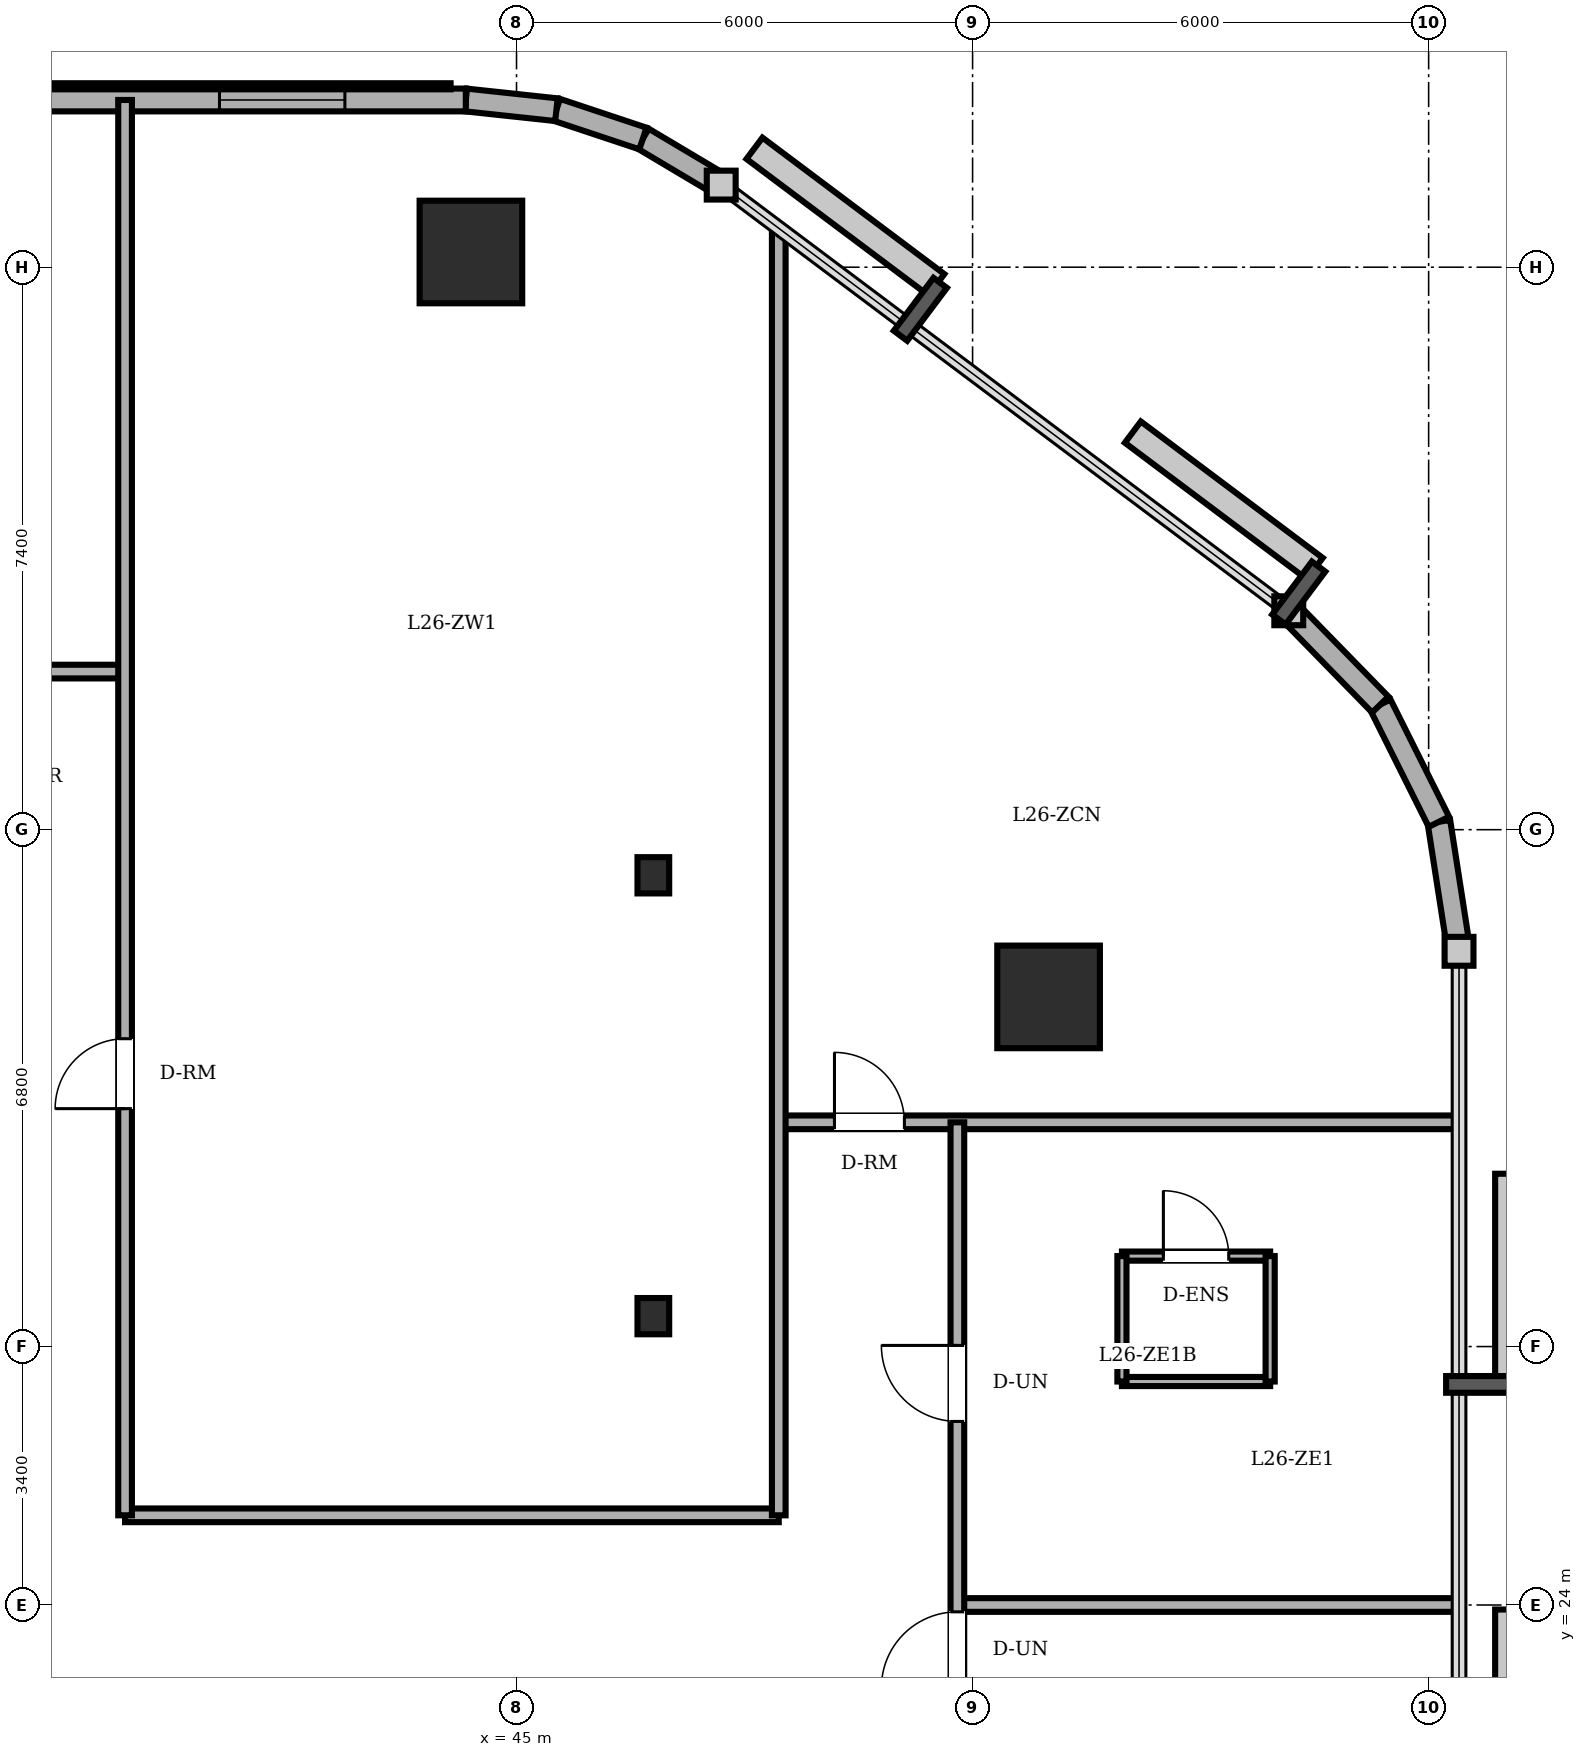
"""IFC4 building model, lengths in metres.
Left out: names, types, materials, properties, quantities, classifications, styles, units other than length and angle.
Written with IfcOpenShell. Run it as: python <this file> out.ifc"""

import sys

from ifc_helpers import new_model, si_unit, direction, frame, frame_2d, origin, origin_2d, place, context, subcontext, project, spatial, rectangle, circle, i_section, extrude, element, fill, save


model = new_model("IFC4")
c1 = context("Model", 3, precision=1e-05, world=origin(), true_north=direction((0.0, 1.0)))
c2 = subcontext(c1, "Body", "Model", "MODEL_VIEW")
j1 = project(units=[si_unit("LENGTHUNIT", "METRE"), si_unit("PLANEANGLEUNIT", "RADIAN")], contexts=[c1])
p1 = place(None, origin())
s1 = spatial("IfcSite", under=j1, at=p1, CompositionType="ELEMENT")
p2 = place(p1, origin())
s2 = spatial("IfcBuilding", under=s1, at=p2, CompositionType="ELEMENT")
p3 = place(p2, frame((0.0, 0.0, 100.7)))
s3 = spatial("IfcBuildingStorey", under=s2, at=p3, CompositionType="ELEMENT", Elevation=100.7)
for number, where, z_axis, x_axis in (
    (1, (52.0, 32.0, 0.0), (0.0, 0.0, 1.0), (1.0, 0.0, 0.0)),
    (2, (44.4, 41.8, 0.0), (0.0, 0.0, 1.0), (1.0, 0.0, 0.0)),
):
    element("IfcColumn", number, at=place(p3, frame(where, z_axis=z_axis, x_axis=x_axis)), inside=s3, PredefinedType="COLUMN", context=c2, shape_type="SweptSolid", body=[
        extrude(circle(Radius=0.675, at=origin_2d()), origin(), (0.0, 0.0, 1.0), 3.6),
    ])
for number, where, z_axis, x_axis in (
    (3, (46.8, 27.8, 0.0), (0.0, 0.0, 1.0), (1.0, 0.0, 0.0)),
    (4, (46.8, 33.6, 0.0), (0.0, 0.0, 1.0), (1.0, 0.0, 0.0)),
):
    element("IfcColumn", number, at=place(p3, frame(where, z_axis=z_axis, x_axis=x_axis)), inside=s3, PredefinedType="COLUMN", context=c2, shape_type="SweptSolid", body=[
        extrude(i_section(OverallWidth=0.417, OverallDepth=0.477, WebThickness=0.036, FlangeThickness=0.057, FilletRadius=0.015, at=origin_2d()), origin(), (0.0, 0.0, 1.0), 3.6),
    ])
p4 = place(p3, frame((57.4, 32.6, 0.0), z_axis=(0.0, 0.0, 1.0), x_axis=(-0.153620989032, 0.988129845581, 0.0)))
e5 = element("IfcWall", 5, at=p4, inside=s3, PredefinedType="SOLIDWALL", context=c2, shape_type="SweptSolid", body=[
    extrude(rectangle(XDim=1.724, YDim=0.3, at=frame_2d((0.862, 0.0))), origin(), (0.0, 0.0, 1.0), 3.4),
])
for number, where, z_axis, x_axis in (
    (6, (57.135, 34.304, 0.0), (0.0, 0.0, 1.0), (-0.447, 0.894, 0.0)),
    (7, (56.364, 35.846, 0.0), (0.0, 0.0, 1.0), (-0.698, 0.716, 0.0)),
):
    element("IfcWall", number, at=place(p3, frame(where, z_axis=z_axis, x_axis=x_axis)), inside=s3, PredefinedType="SOLIDWALL", context=c2, shape_type="SweptSolid", body=[
        extrude(rectangle(XDim=1.724, YDim=0.3, at=frame_2d((0.862, 0.0))), origin(), (0.0, 0.0, 1.0), 3.4),
    ])
p5 = place(p3, frame((47.693, 42.68, 0.0), z_axis=(0.0, 0.0, 1.0), x_axis=(-0.859320591642, 0.511437308749, 0.0)))
e8 = element("IfcWall", 8, at=p5, inside=s3, PredefinedType="SOLIDWALL", context=c2, shape_type="SweptSolid", body=[
    extrude(rectangle(XDim=1.199, YDim=0.3, at=frame_2d((0.599, 0.0))), origin(), (0.0, 0.0, 1.0), 3.4),
])
p6 = place(p3, frame((46.663, 43.293, 0.0), z_axis=(0.0, 0.0, 1.0), x_axis=(-0.948744332129, 0.316044604847, 0.0)))
e9 = element("IfcWall", 9, at=p6, inside=s3, PredefinedType="SOLIDWALL", context=c2, shape_type="SweptSolid", body=[
    extrude(rectangle(XDim=1.2, YDim=0.3, at=frame_2d((0.6, 0.0))), origin(), (0.0, 0.0, 1.0), 3.4),
])
p7 = place(p3, frame((45.525, 43.672, 0.0), z_axis=(0.0, 0.0, 1.0), x_axis=(-0.994289103787, 0.106720092254, 0.0)))
e10 = element("IfcWall", 10, at=p7, inside=s3, PredefinedType="SOLIDWALL", context=c2, shape_type="SweptSolid", body=[
    extrude(rectangle(XDim=1.199, YDim=0.3, at=frame_2d((0.599, 0.0))), origin(), (0.0, 0.0, 1.0), 3.4),
])
p8 = place(p3, frame((44.333, 43.8, 0.0), z_axis=(0.0, 0.0, 1.0), x_axis=(-1.0, 0.0, 0.0)))
e11 = element("IfcWall", 11, at=p8, inside=s3, PredefinedType="SOLIDWALL", context=c2, shape_type="SweptSolid", body=[
    extrude(rectangle(XDim=29.933, YDim=0.3, at=frame_2d((14.967, 0.0))), origin(), (0.0, 0.0, 1.0), 3.4),
])
p9 = place(p8, frame((18.883, 0.0, 0.0)))
e12 = element("IfcOpeningElement", 12, at=p9, cuts=e11, PredefinedType="OPENING", context=c2, shape_type="SweptSolid", body=[
    extrude(rectangle(XDim=0.95, YDim=2.2, at=frame_2d((0.475, 1.1))), frame((0.0, 0.16, 0.0), z_axis=(0.0, -1.0, 0.0), x_axis=(1.0, 0.0, 0.0)), (0.0, 0.0, 1.0), 0.32),
])
p10 = place(p8, frame((1.591, 0.0, 0.85)))
e13 = element("IfcOpeningElement", 13, at=p10, cuts=e11, PredefinedType="OPENING", context=c2, shape_type="SweptSolid", body=[
    extrude(rectangle(XDim=1.65, YDim=1.55, at=frame_2d((0.825, 0.775))), frame((0.0, 0.16, 0.0), z_axis=(0.0, -1.0, 0.0), x_axis=(1.0, 0.0, 0.0)), (0.0, 0.0, 1.0), 0.32),
])
p11 = place(p8, frame((6.808, 0.0, 0.85)))
e14 = element("IfcOpeningElement", 14, at=p11, cuts=e11, PredefinedType="OPENING", context=c2, shape_type="SweptSolid", body=[
    extrude(rectangle(XDim=1.65, YDim=1.55, at=frame_2d((0.825, 0.775))), frame((0.0, 0.16, 0.0), z_axis=(0.0, -1.0, 0.0), x_axis=(1.0, 0.0, 0.0)), (0.0, 0.0, 1.0), 0.32),
])
p12 = place(p8, frame((9.958, 0.0, 0.85)))
e15 = element("IfcOpeningElement", 15, at=p12, cuts=e11, PredefinedType="OPENING", context=c2, shape_type="SweptSolid", body=[
    extrude(rectangle(XDim=1.65, YDim=1.55, at=frame_2d((0.825, 0.775))), frame((0.0, 0.16, 0.0), z_axis=(0.0, -1.0, 0.0), x_axis=(1.0, 0.0, 0.0)), (0.0, 0.0, 1.0), 0.32),
])
p13 = place(p8, frame((15.508, 0.0, 0.85)))
e16 = element("IfcOpeningElement", 16, at=p13, cuts=e11, PredefinedType="OPENING", context=c2, shape_type="SweptSolid", body=[
    extrude(rectangle(XDim=1.65, YDim=1.55, at=frame_2d((0.825, 0.775))), frame((0.0, 0.16, 0.0), z_axis=(0.0, -1.0, 0.0), x_axis=(1.0, 0.0, 0.0)), (0.0, 0.0, 1.0), 0.32),
])
p14 = place(p8, frame((23.125, 0.0, 0.85)))
e17 = element("IfcOpeningElement", 17, at=p14, cuts=e11, PredefinedType="OPENING", context=c2, shape_type="SweptSolid", body=[
    extrude(rectangle(XDim=1.65, YDim=1.55, at=frame_2d((0.825, 0.775))), frame((0.0, 0.16, 0.0), z_axis=(0.0, -1.0, 0.0), x_axis=(1.0, 0.0, 0.0)), (0.0, 0.0, 1.0), 0.32),
])
p15 = place(p8, frame((25.941, 0.0, 0.85)))
e18 = element("IfcOpeningElement", 18, at=p15, cuts=e11, PredefinedType="OPENING", context=c2, shape_type="SweptSolid", body=[
    extrude(rectangle(XDim=1.65, YDim=1.55, at=frame_2d((0.825, 0.775))), frame((0.0, 0.16, 0.0), z_axis=(0.0, -1.0, 0.0), x_axis=(1.0, 0.0, 0.0)), (0.0, 0.0, 1.0), 0.32),
])
p16 = place(p3, frame((52.965, 28.59, 0.0), z_axis=(0.0, 0.0, 1.0), x_axis=(1.0, 0.0, 0.0)))
e19 = element("IfcWall", 19, at=p16, inside=s3, PredefinedType="PARTITIONING", context=c2, shape_type="SweptSolid", body=[
    extrude(rectangle(XDim=1.95, YDim=0.12, at=frame_2d((0.975, 0.0))), origin(), (0.0, 0.0, 1.0), 3.4),
])
p17 = place(p16, frame((0.545, 0.0, 0.0)))
e20 = element("IfcOpeningElement", 20, at=p17, cuts=e19, PredefinedType="OPENING", context=c2, shape_type="SweptSolid", body=[
    extrude(rectangle(XDim=0.86, YDim=2.1, at=frame_2d((0.43, 1.05))), frame((0.0, 0.07, 0.0), z_axis=(0.0, -1.0, 0.0), x_axis=(1.0, 0.0, 0.0)), (0.0, 0.0, 1.0), 0.14),
])
p18 = place(p3, frame((54.915, 26.94, 0.0), z_axis=(0.0, 0.0, 1.0), x_axis=(-1.0, 0.0, 0.0)))
e21 = element("IfcWall", 21, at=p18, inside=s3, PredefinedType="PARTITIONING", context=c2, shape_type="SweptSolid", body=[
    extrude(rectangle(XDim=1.95, YDim=0.12, at=frame_2d((0.975, 0.0))), origin(), (0.0, 0.0, 1.0), 3.4),
])
for number, where, z_axis, x_axis in (
    (22, (52.965, 28.59, 0.0), (0.0, 0.0, 1.0), (0.0, -1.0, 0.0)),
    (23, (54.915, 26.94, 0.0), (0.0, 0.0, 1.0), (0.0, 1.0, 0.0)),
):
    element("IfcWall", number, at=place(p3, frame(where, z_axis=z_axis, x_axis=x_axis)), inside=s3, PredefinedType="PARTITIONING", context=c2, shape_type="SweptSolid", body=[
        extrude(rectangle(XDim=1.65, YDim=0.12, at=frame_2d((0.825, 0.0))), origin(), (0.0, 0.0, 1.0), 3.4),
    ])
p19 = place(p3, frame((50.8, 24.0, 0.0), z_axis=(0.0, 0.0, 1.0), x_axis=(1.0, 0.0, 0.0)))
e24 = element("IfcWall", 24, at=p19, inside=s3, PredefinedType="PARTITIONING", context=c2, shape_type="SweptSolid", body=[
    extrude(rectangle(XDim=6.6, YDim=0.18, at=frame_2d((3.3, 0.0))), origin(), (0.0, 0.0, 1.0), 3.182),
])
p20 = place(p3, frame((39.85, 25.18, 0.0), z_axis=(0.0, 0.0, 1.0), x_axis=(1.0, 0.0, 0.0)))
e25 = element("IfcWall", 25, at=p20, inside=s3, PredefinedType="PARTITIONING", context=c2, shape_type="SweptSolid", body=[
    extrude(rectangle(XDim=8.6, YDim=0.18, at=frame_2d((4.3, 0.0))), origin(), (0.0, 0.0, 1.0), 3.4),
])
p21 = place(p3, frame((48.45, 30.35, 0.0), z_axis=(0.0, 0.0, 1.0), x_axis=(1.0, 0.0, 0.0)))
e26 = element("IfcWall", 26, at=p21, inside=s3, PredefinedType="PARTITIONING", context=c2, shape_type="SweptSolid", body=[
    extrude(rectangle(XDim=8.95, YDim=0.18, at=frame_2d((4.475, 0.0))), origin(), (0.0, 0.0, 1.0), 3.4),
])
p22 = place(p21, frame((0.733, 0.0, 0.0)))
e27 = element("IfcOpeningElement", 27, at=p22, cuts=e26, PredefinedType="OPENING", context=c2, shape_type="SweptSolid", body=[
    extrude(rectangle(XDim=0.92, YDim=2.1, at=frame_2d((0.46, 1.05))), frame((0.0, 0.1, 0.0), z_axis=(0.0, -1.0, 0.0), x_axis=(1.0, 0.0, 0.0)), (0.0, 0.0, 1.0), 0.2),
])
p23 = place(p3, frame((8.8, 36.28, 0.0), z_axis=(0.0, 0.0, 1.0), x_axis=(1.0, 0.0, 0.0)))
e28 = element("IfcWall", 28, at=p23, inside=s3, PredefinedType="PARTITIONING", context=c2, shape_type="SweptSolid", body=[
    extrude(rectangle(XDim=31.05, YDim=0.18, at=frame_2d((15.525, 0.0))), origin(), (0.0, 0.0, 1.0), 3.4),
])
p24 = place(p23, frame((15.65, 0.0, 0.0)))
e29 = element("IfcOpeningElement", 29, at=p24, cuts=e28, PredefinedType="OPENING", context=c2, shape_type="SweptSolid", body=[
    extrude(rectangle(XDim=0.9, YDim=2.1, at=frame_2d((0.45, 1.05))), frame((0.0, 0.1, 0.0), z_axis=(0.0, -1.0, 0.0), x_axis=(1.0, 0.0, 0.0)), (0.0, 0.0, 1.0), 0.2),
])
p25 = place(p23, frame((19.27, 0.0, 0.0)))
e30 = element("IfcOpeningElement", 30, at=p25, cuts=e28, PredefinedType="OPENING", context=c2, shape_type="SweptSolid", body=[
    extrude(rectangle(XDim=0.86, YDim=2.1, at=frame_2d((0.43, 1.05))), frame((0.0, 0.1, 0.0), z_axis=(0.0, -1.0, 0.0), x_axis=(1.0, 0.0, 0.0)), (0.0, 0.0, 1.0), 0.2),
])
p26 = place(p23, frame((7.3, 0.0, 0.0)))
e31 = element("IfcOpeningElement", 31, at=p26, cuts=e28, PredefinedType="OPENING", context=c2, shape_type="SweptSolid", body=[
    extrude(rectangle(XDim=1.0, YDim=2.15, at=frame_2d((0.5, 1.075))), frame((0.0, 0.1, 0.0), z_axis=(0.0, -1.0, 0.0), x_axis=(1.0, 0.0, 0.0)), (0.0, 0.0, 1.0), 0.2),
])
p27 = place(p23, frame((25.605, 0.0, 0.0)))
e32 = element("IfcOpeningElement", 32, at=p27, cuts=e28, PredefinedType="OPENING", context=c2, shape_type="SweptSolid", body=[
    extrude(rectangle(XDim=0.92, YDim=2.1, at=frame_2d((0.46, 1.05))), frame((0.0, 0.1, 0.0), z_axis=(0.0, -1.0, 0.0), x_axis=(1.0, 0.0, 0.0)), (0.0, 0.0, 1.0), 0.2),
])
p28 = place(p3, frame((39.85, 25.18, 0.0), z_axis=(0.0, 0.0, 1.0), x_axis=(0.0, 1.0, 0.0)))
e33 = element("IfcWall", 33, at=p28, inside=s3, PredefinedType="PARTITIONING", context=c2, shape_type="SweptSolid", body=[
    extrude(rectangle(XDim=18.62, YDim=0.18, at=frame_2d((9.31, 0.0))), origin(), (0.0, 0.0, 1.0), 3.4),
])
p29 = place(p28, frame((5.35, 0.0, 0.0)))
e34 = element("IfcOpeningElement", 34, at=p29, cuts=e33, PredefinedType="OPENING", context=c2, shape_type="SweptSolid", body=[
    extrude(rectangle(XDim=0.92, YDim=2.1, at=frame_2d((0.46, 1.05))), frame((0.0, 0.1, 0.0), z_axis=(0.0, -1.0, 0.0), x_axis=(1.0, 0.0, 0.0)), (0.0, 0.0, 1.0), 0.2),
])
p30 = place(p3, frame((48.45, 25.18, 0.0), z_axis=(0.0, 0.0, 1.0), x_axis=(0.0, 1.0, 0.0)))
e35 = element("IfcWall", 35, at=p30, inside=s3, PredefinedType="PARTITIONING", context=c2, shape_type="SweptSolid", body=[
    extrude(rectangle(XDim=16.932, YDim=0.18, at=frame_2d((8.466, 0.0))), origin(), (0.0, 0.0, 1.0), 3.4),
])
p31 = place(p3, frame((50.8, 7.65, 0.0), z_axis=(0.0, 0.0, 1.0), x_axis=(0.0, 1.0, 0.0)))
e36 = element("IfcWall", 36, at=p31, inside=s3, PredefinedType="PARTITIONING", context=c2, shape_type="SweptSolid", body=[
    extrude(rectangle(XDim=22.7, YDim=0.18, at=frame_2d((11.35, 0.0))), origin(), (0.0, 0.0, 1.0), 3.4),
])
p32 = place(p31, frame((18.765, 0.0, 0.0)))
e37 = element("IfcOpeningElement", 37, at=p32, cuts=e36, PredefinedType="OPENING", context=c2, shape_type="SweptSolid", body=[
    extrude(rectangle(XDim=1.0, YDim=2.15, at=frame_2d((0.5, 1.075))), frame((0.0, 0.1, 0.0), z_axis=(0.0, -1.0, 0.0), x_axis=(1.0, 0.0, 0.0)), (0.0, 0.0, 1.0), 0.2),
])
p33 = place(p31, frame((15.26, 0.0, 0.0)))
e38 = element("IfcOpeningElement", 38, at=p33, cuts=e36, PredefinedType="OPENING", context=c2, shape_type="SweptSolid", body=[
    extrude(rectangle(XDim=1.0, YDim=2.15, at=frame_2d((0.5, 1.075))), frame((0.0, 0.1, 0.0), z_axis=(0.0, -1.0, 0.0), x_axis=(1.0, 0.0, 0.0)), (0.0, 0.0, 1.0), 0.2),
])
p34 = place(p10, origin())
e39 = element("IfcWindow", 39, at=p34, inside=s3, PartitioningType="DOUBLE_PANEL_VERTICAL", PredefinedType="WINDOW", context=c2, shape_type="SweptSolid", body=[
    extrude(rectangle(XDim=1.65, YDim=1.55, at=frame_2d((0.825, 0.775))), frame((0.0, 0.03, 0.0), z_axis=(0.0, -1.0, 0.0), x_axis=(1.0, 0.0, 0.0)), (0.0, 0.0, 1.0), 0.06),
])
fill(e13, e39)
p35 = place(p17, origin())
e40 = element("IfcDoor", 40, at=p35, inside=s3, OperationType="SINGLE_SWING_LEFT", PredefinedType="DOOR", context=c2, shape_type="SweptSolid", body=[
    extrude(rectangle(XDim=0.86, YDim=2.1, at=frame_2d((0.43, 1.05))), frame((0.0, 0.025, 0.0), z_axis=(0.0, -1.0, 0.0), x_axis=(1.0, 0.0, 0.0)), (0.0, 0.0, 1.0), 0.05),
])
fill(e20, e40)
p36 = place(p29, origin())
e41 = element("IfcDoor", 41, at=p36, inside=s3, OperationType="SINGLE_SWING_LEFT", PredefinedType="DOOR", context=c2, shape_type="SweptSolid", body=[
    extrude(rectangle(XDim=0.92, YDim=2.1, at=frame_2d((0.46, 1.05))), frame((0.0, 0.025, 0.0), z_axis=(0.0, -1.0, 0.0), x_axis=(1.0, 0.0, 0.0)), (0.0, 0.0, 1.0), 0.05),
])
fill(e34, e41)
p37 = place(p22, origin())
e42 = element("IfcDoor", 42, at=p37, inside=s3, OperationType="SINGLE_SWING_LEFT", PredefinedType="DOOR", context=c2, shape_type="SweptSolid", body=[
    extrude(rectangle(XDim=0.92, YDim=2.1, at=frame_2d((0.46, 1.05))), frame((0.0, 0.025, 0.0), z_axis=(0.0, -1.0, 0.0), x_axis=(1.0, 0.0, 0.0)), (0.0, 0.0, 1.0), 0.05),
])
fill(e27, e42)
p38 = place(p32, origin())
e43 = element("IfcDoor", 43, at=p38, inside=s3, OperationType="SINGLE_SWING_RIGHT", PredefinedType="DOOR", context=c2, shape_type="SweptSolid", body=[
    extrude(rectangle(XDim=1.0, YDim=2.15, at=frame_2d((0.5, 1.075))), frame((0.0, 0.025, 0.0), z_axis=(0.0, -1.0, 0.0), x_axis=(1.0, 0.0, 0.0)), (0.0, 0.0, 1.0), 0.05),
])
fill(e37, e43)
p39 = place(p33, origin())
e44 = element("IfcDoor", 44, at=p39, inside=s3, OperationType="SINGLE_SWING_LEFT", PredefinedType="DOOR", context=c2, shape_type="SweptSolid", body=[
    extrude(rectangle(XDim=1.0, YDim=2.15, at=frame_2d((0.5, 1.075))), frame((0.0, 0.025, 0.0), z_axis=(0.0, -1.0, 0.0), x_axis=(1.0, 0.0, 0.0)), (0.0, 0.0, 1.0), 0.05),
])
fill(e38, e44)
save(model, sys.argv[1])
